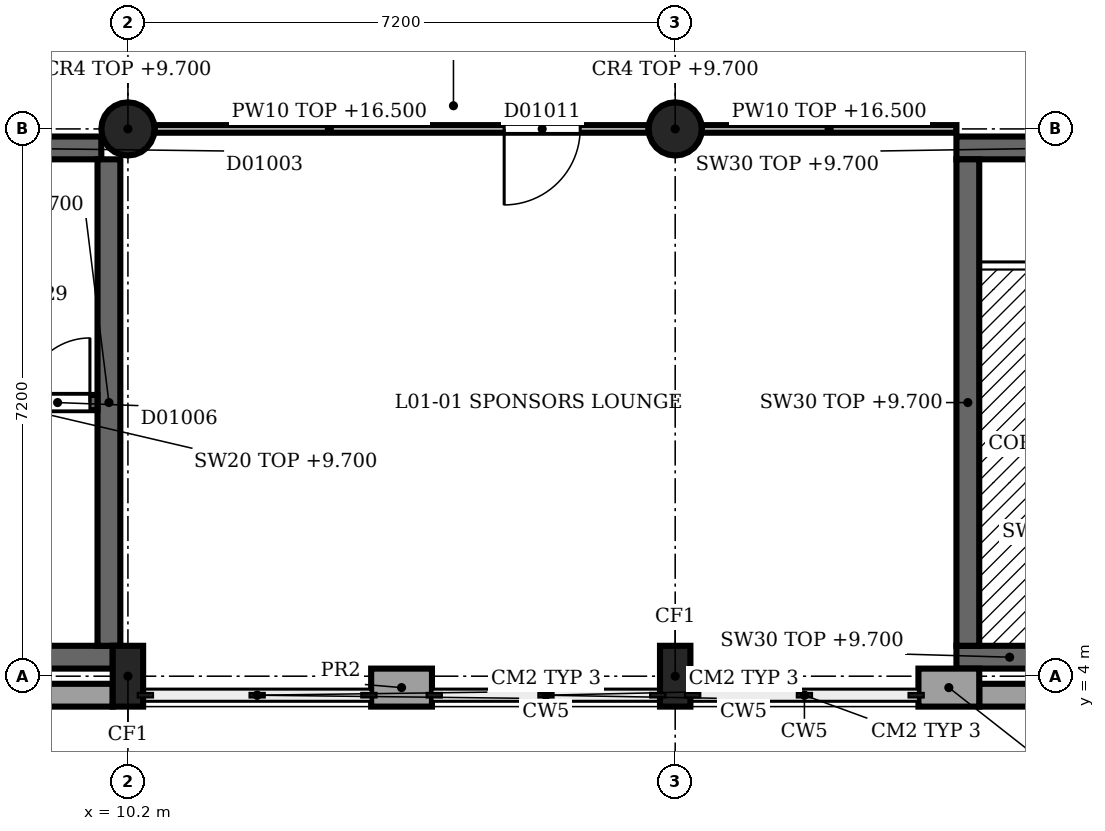
"""IFC4 building model, lengths in metres.
Left out: names, types, materials, properties, quantities, classifications, styles, units other than length and angle.
Written with IfcOpenShell. Run it as: python <this file> out.ifc"""

import sys

from ifc_helpers import new_model, si_unit, direction, frame, frame_2d, origin, origin_2d, place, context, subcontext, project, spatial, rectangle, circle, extrude, element, fill, save


model = new_model("IFC4")
c1 = context("Model", 3, precision=1e-05, world=origin(), true_north=direction((0.0, 1.0)))
c2 = subcontext(c1, "Body", "Model", "MODEL_VIEW")
j1 = project(units=[si_unit("LENGTHUNIT", "METRE"), si_unit("PLANEANGLEUNIT", "RADIAN")], contexts=[c1])
p1 = place(None, origin())
s1 = spatial("IfcSite", under=j1, at=p1, CompositionType="ELEMENT")
p2 = place(p1, origin())
s2 = spatial("IfcBuilding", under=s1, at=p2, CompositionType="ELEMENT")
p3 = place(p2, frame((0.0, 0.0, 5.4)))
s3 = spatial("IfcBuildingStorey", under=s2, at=p3, CompositionType="ELEMENT", Elevation=5.4)
p4 = place(p3, frame((10.2, 4.0, 0.0), z_axis=(0.0, 0.0, 1.0), x_axis=(1.0, 0.0, 0.0)))
e1 = element("IfcColumn", 1, at=p4, inside=s3, PredefinedType="COLUMN", context=c2, shape_type="SweptSolid", body=[
    extrude(rectangle(XDim=0.4, YDim=0.8, at=origin_2d()), origin(), (0.0, 0.0, 1.0), 4.5),
])
p5 = place(p3, frame((10.2, 11.2, 0.0), z_axis=(0.0, 0.0, 1.0), x_axis=(1.0, 0.0, 0.0)))
e2 = element("IfcColumn", 2, at=p5, inside=s3, PredefinedType="COLUMN", context=c2, shape_type="SweptSolid", body=[
    extrude(circle(Radius=0.35, at=origin_2d()), origin(), (0.0, 0.0, 1.0), 4.3),
])
p6 = place(p3, frame((17.4, 4.0, 0.0), z_axis=(0.0, 0.0, 1.0), x_axis=(1.0, 0.0, 0.0)))
e3 = element("IfcColumn", 3, at=p6, inside=s3, PredefinedType="COLUMN", context=c2, shape_type="SweptSolid", body=[
    extrude(rectangle(XDim=0.4, YDim=0.8, at=origin_2d()), origin(), (0.0, 0.0, 1.0), 4.5),
])
p7 = place(p3, frame((17.4, 11.2, 0.0), z_axis=(0.0, 0.0, 1.0), x_axis=(1.0, 0.0, 0.0)))
e4 = element("IfcColumn", 4, at=p7, inside=s3, PredefinedType="COLUMN", context=c2, shape_type="SweptSolid", body=[
    extrude(circle(Radius=0.35, at=origin_2d()), origin(), (0.0, 0.0, 1.0), 4.3),
])
p8 = place(p3, frame((21.4, 3.85, 0.0), z_axis=(0.0, 0.0, 1.0), x_axis=(-1.0, 0.0, 0.0)))
e5 = element("IfcWall", 5, at=p8, inside=s3, PredefinedType="SOLIDWALL", context=c2, shape_type="SweptSolid", body=[
    extrude(rectangle(XDim=0.8, YDim=0.5, at=frame_2d((0.4, 0.0))), origin(), (0.0, 0.0, 1.0), 4.5),
])
p9 = place(p3, frame((14.2, 3.85, 0.0), z_axis=(0.0, 0.0, 1.0), x_axis=(-1.0, 0.0, 0.0)))
e6 = element("IfcWall", 6, at=p9, inside=s3, PredefinedType="SOLIDWALL", context=c2, shape_type="SweptSolid", body=[
    extrude(rectangle(XDim=0.8, YDim=0.5, at=frame_2d((0.4, 0.0))), origin(), (0.0, 0.0, 1.0), 4.5),
])
p10 = place(p3, frame((24.4, 3.75, 0.0), z_axis=(0.0, 0.0, 1.0), x_axis=(-1.0, 0.0, 0.0)))
e7 = element("IfcWall", 7, at=p10, inside=s3, PredefinedType="SOLIDWALL", context=c2, shape_type="SweptSolid", body=[
    extrude(rectangle(XDim=3.0, YDim=0.3, at=frame_2d((1.5, 0.0))), origin(), (0.0, 0.0, 1.0), 4.5),
])
p11 = place(p10, frame((1.3, 0.0, 1.2)))
e8 = element("IfcOpeningElement", 8, at=p11, cuts=e7, PredefinedType="OPENING", context=c2, shape_type="SweptSolid", body=[
    extrude(rectangle(XDim=0.6, YDim=1.8, at=frame_2d((0.3, 0.9))), frame((0.0, 0.16, 0.0), z_axis=(0.0, -1.0, 0.0), x_axis=(1.0, 0.0, 0.0)), (0.0, 0.0, 1.0), 0.32),
])
p12 = place(p3, frame((10.0, 3.75, 0.0), z_axis=(0.0, 0.0, 1.0), x_axis=(-1.0, 0.0, 0.0)))
e9 = element("IfcWall", 9, at=p12, inside=s3, PredefinedType="SOLIDWALL", context=c2, shape_type="SweptSolid", body=[
    extrude(rectangle(XDim=3.0, YDim=0.3, at=frame_2d((1.5, 0.0))), origin(), (0.0, 0.0, 1.0), 4.5),
])
p13 = place(p3, frame((9.85, 10.95, 0.0), z_axis=(0.0, 0.0, 1.0), x_axis=(-1.0, 0.0, 0.0)))
e10 = element("IfcWall", 10, at=p13, inside=s3, PredefinedType="SHEAR", context=c2, shape_type="SweptSolid", body=[
    extrude(rectangle(XDim=6.5, YDim=0.3, at=frame_2d((3.25, 0.0))), origin(), (0.0, 0.0, 1.0), 4.3),
])
p14 = place(p13, frame((1.05, 0.0, 0.0)))
e11 = element("IfcOpeningElement", 11, at=p14, cuts=e10, PredefinedType="OPENING", context=c2, shape_type="SweptSolid", body=[
    extrude(rectangle(XDim=1.2, YDim=2.1, at=frame_2d((0.6, 1.05))), frame((0.0, 0.16, 0.0), z_axis=(0.0, -1.0, 0.0), x_axis=(1.0, 0.0, 0.0)), (0.0, 0.0, 1.0), 0.32),
])
p15 = place(p3, frame((3.2, 4.25, 0.0), z_axis=(0.0, 0.0, 1.0), x_axis=(1.0, 0.0, 0.0)))
e12 = element("IfcWall", 12, at=p15, inside=s3, PredefinedType="SHEAR", context=c2, shape_type="SweptSolid", body=[
    extrude(rectangle(XDim=6.8, YDim=0.3, at=frame_2d((3.4, 0.0))), origin(), (0.0, 0.0, 1.0), 4.3),
])
p16 = place(p15, frame((1.3, 0.0, 1.2)))
e13 = element("IfcOpeningElement", 13, at=p16, cuts=e12, PredefinedType="OPENING", context=c2, shape_type="SweptSolid", body=[
    extrude(rectangle(XDim=0.6, YDim=1.8, at=frame_2d((0.3, 0.9))), frame((0.0, 0.16, 0.0), z_axis=(0.0, -1.0, 0.0), x_axis=(1.0, 0.0, 0.0)), (0.0, 0.0, 1.0), 0.32),
])
p17 = place(p3, frame((9.95, 4.4, 0.0), z_axis=(0.0, 0.0, 1.0), x_axis=(0.0, 1.0, 0.0)))
e14 = element("IfcWall", 14, at=p17, inside=s3, PredefinedType="SHEAR", context=c2, shape_type="SweptSolid", body=[
    extrude(rectangle(XDim=6.4, YDim=0.3, at=frame_2d((3.2, 0.0))), origin(), (0.0, 0.0, 1.0), 4.3),
])
p18 = place(p3, frame((6.55, 7.6, 0.0), z_axis=(0.0, 0.0, 1.0), x_axis=(1.0, 0.0, 0.0)))
e15 = element("IfcWall", 15, at=p18, inside=s3, PredefinedType="SHEAR", context=c2, shape_type="SweptSolid", body=[
    extrude(rectangle(XDim=3.25, YDim=0.2, at=frame_2d((1.625, 0.0))), origin(), (0.0, 0.0, 1.0), 4.3),
])
p19 = place(p18, frame((0.45, 0.0, 0.0)))
e16 = element("IfcOpeningElement", 16, at=p19, cuts=e15, PredefinedType="OPENING", context=c2, shape_type="SweptSolid", body=[
    extrude(rectangle(XDim=1.1, YDim=2.1, at=frame_2d((0.55, 1.05))), frame((0.0, 0.11, 0.0), z_axis=(0.0, -1.0, 0.0), x_axis=(1.0, 0.0, 0.0)), (0.0, 0.0, 1.0), 0.22),
])
p20 = place(p18, frame((2.3, 0.0, 0.0)))
e17 = element("IfcOpeningElement", 17, at=p20, cuts=e15, PredefinedType="OPENING", context=c2, shape_type="SweptSolid", body=[
    extrude(rectangle(XDim=0.85, YDim=2.1, at=frame_2d((0.425, 1.05))), frame((0.0, 0.11, 0.0), z_axis=(0.0, -1.0, 0.0), x_axis=(1.0, 0.0, 0.0)), (0.0, 0.0, 1.0), 0.22),
])
p21 = place(p3, frame((24.25, 10.95, 0.0), z_axis=(0.0, 0.0, 1.0), x_axis=(-1.0, 0.0, 0.0)))
e18 = element("IfcWall", 18, at=p21, inside=s3, PredefinedType="SHEAR", context=c2, shape_type="SweptSolid", body=[
    extrude(rectangle(XDim=3.15, YDim=0.3, at=frame_2d((1.575, 0.0))), origin(), (0.0, 0.0, 1.0), 4.3),
])
p22 = place(p3, frame((21.1, 4.25, 0.0), z_axis=(0.0, 0.0, 1.0), x_axis=(1.0, 0.0, 0.0)))
e19 = element("IfcWall", 19, at=p22, inside=s3, PredefinedType="SHEAR", context=c2, shape_type="SweptSolid", body=[
    extrude(rectangle(XDim=3.3, YDim=0.3, at=frame_2d((1.65, 0.0))), origin(), (0.0, 0.0, 1.0), 4.3),
])
p23 = place(p22, frame((1.4, 0.0, 1.2)))
e20 = element("IfcOpeningElement", 20, at=p23, cuts=e19, PredefinedType="OPENING", context=c2, shape_type="SweptSolid", body=[
    extrude(rectangle(XDim=0.6, YDim=1.8, at=frame_2d((0.3, 0.9))), frame((0.0, 0.16, 0.0), z_axis=(0.0, -1.0, 0.0), x_axis=(1.0, 0.0, 0.0)), (0.0, 0.0, 1.0), 0.32),
])
p24 = place(p3, frame((21.25, 4.4, 0.0), z_axis=(0.0, 0.0, 1.0), x_axis=(0.0, 1.0, 0.0)))
e21 = element("IfcWall", 21, at=p24, inside=s3, PredefinedType="SHEAR", context=c2, shape_type="SweptSolid", body=[
    extrude(rectangle(XDim=6.4, YDim=0.3, at=frame_2d((3.2, 0.0))), origin(), (0.0, 0.0, 1.0), 4.3),
])
p25 = place(p3, frame((17.05, 11.2, 0.0), z_axis=(0.0, 0.0, 1.0), x_axis=(-1.0, 0.0, 0.0)))
e22 = element("IfcWall", 22, at=p25, inside=s3, PredefinedType="PARTITIONING", context=c2, shape_type="SweptSolid", body=[
    extrude(rectangle(XDim=6.5, YDim=0.1, at=frame_2d((3.25, 0.0))), origin(), (0.0, 0.0, 1.0), 11.1),
])
p26 = place(p25, frame((0.9, 0.0, 0.0)))
e23 = element("IfcOpeningElement", 23, at=p26, cuts=e22, PredefinedType="OPENING", context=c2, shape_type="SweptSolid", body=[
    extrude(rectangle(XDim=1.0, YDim=2.1, at=frame_2d((0.5, 1.05))), frame((0.0, 0.06, 0.0), z_axis=(0.0, -1.0, 0.0), x_axis=(1.0, 0.0, 0.0)), (0.0, 0.0, 1.0), 0.12),
])
p27 = place(p3, frame((17.75, 11.2, 0.0), z_axis=(0.0, 0.0, 1.0), x_axis=(1.0, 0.0, 0.0)))
e24 = element("IfcWall", 24, at=p27, inside=s3, PredefinedType="PARTITIONING", context=c2, shape_type="SweptSolid", body=[
    extrude(rectangle(XDim=3.35, YDim=0.1, at=frame_2d((1.675, 0.0))), origin(), (0.0, 0.0, 1.0), 11.1),
])
p28 = place(p20, origin())
e25 = element("IfcDoor", 25, at=p28, inside=s3, OperationType="SINGLE_SWING_RIGHT", PredefinedType="DOOR", context=c2, shape_type="SweptSolid", body=[
    extrude(rectangle(XDim=0.85, YDim=2.1, at=frame_2d((0.425, 1.05))), frame((0.0, 0.025, 0.0), z_axis=(0.0, -1.0, 0.0), x_axis=(1.0, 0.0, 0.0)), (0.0, 0.0, 1.0), 0.05),
])
fill(e17, e25)
p29 = place(p26, origin())
e26 = element("IfcDoor", 26, at=p29, inside=s3, OperationType="SINGLE_SWING_LEFT", PredefinedType="DOOR", context=c2, shape_type="SweptSolid", body=[
    extrude(rectangle(XDim=1.0, YDim=2.1, at=frame_2d((0.5, 1.05))), frame((0.0, 0.025, 0.0), z_axis=(0.0, -1.0, 0.0), x_axis=(1.0, 0.0, 0.0)), (0.0, 0.0, 1.0), 0.05),
])
fill(e23, e26)
save(model, sys.argv[1])
